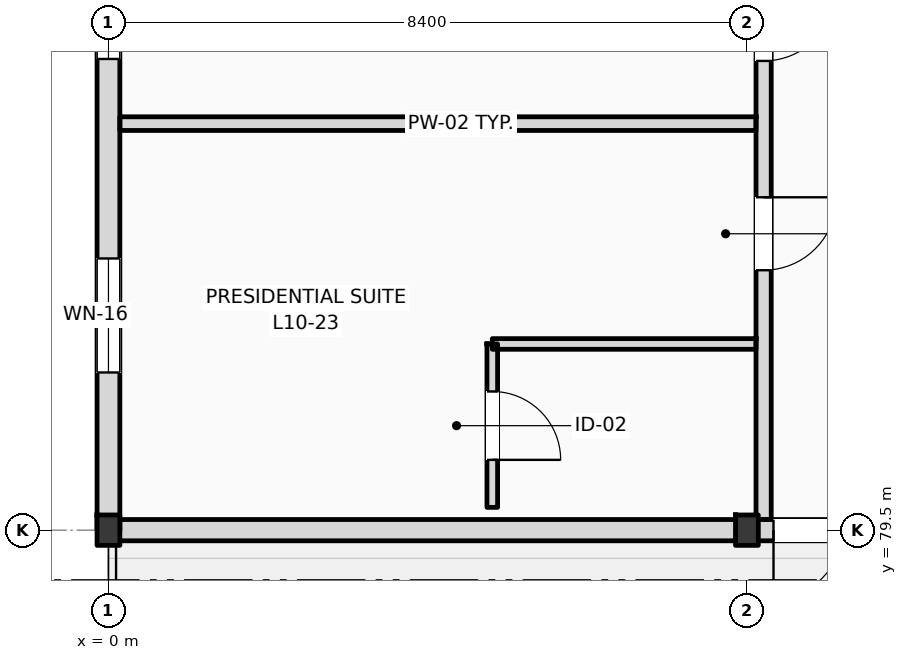
"""IFC4 building model, lengths in metres.
Left out: names, types, materials, properties, quantities, classifications, styles, units other than length and angle.
Written with IfcOpenShell. Run it as: python <this file> out.ifc"""

import sys

from ifc_helpers import new_model, si_unit, direction, frame, frame_2d, origin, origin_2d, place, context, subcontext, project, spatial, rectangle, i_section, extrude, element, fill, save


model = new_model("IFC4")
c1 = context("Model", 3, precision=1e-05, world=origin(), true_north=direction((0.0, 1.0)))
c2 = subcontext(c1, "Body", "Model", "MODEL_VIEW")
j1 = project(units=[si_unit("LENGTHUNIT", "METRE"), si_unit("PLANEANGLEUNIT", "RADIAN")], contexts=[c1])
p1 = place(None, origin())
s1 = spatial("IfcSite", under=j1, at=p1, CompositionType="ELEMENT")
p2 = place(p1, origin())
s2 = spatial("IfcBuilding", under=s1, at=p2, CompositionType="ELEMENT")
p3 = place(p2, frame((0.0, 0.0, 42.6)))
s3 = spatial("IfcBuildingStorey", under=s2, at=p3, CompositionType="ELEMENT", Elevation=42.6)
for number, where, z_axis, x_axis in (
    (1, (0.0, 79.5, 0.0), (0.0, 0.0, 1.0), (1.0, 0.0, 0.0)),
    (2, (8.4, 79.5, 0.0), (0.0, 0.0, 1.0), (1.0, 0.0, 0.0)),
):
    element("IfcColumn", number, at=place(p3, frame(where, z_axis=z_axis, x_axis=x_axis)), inside=s3, PredefinedType="COLUMN", context=c2, shape_type="SweptSolid", body=[
        extrude(i_section(OverallWidth=0.3, OverallDepth=0.4, WebThickness=0.013, FlangeThickness=0.024, FilletRadius=0.027, at=origin_2d()), origin(), (0.0, 0.0, 1.0), 4.2),
    ])
p4 = place(p3, frame((0.0, 79.5, 0.0), z_axis=(0.0, 0.0, 1.0), x_axis=(0.0, 1.0, 0.0)))
e3 = element("IfcWall", 3, at=p4, inside=s3, PredefinedType="STANDARD", context=c2, shape_type="SweptSolid", body=[
    extrude(rectangle(XDim=8.5, YDim=0.3, at=frame_2d((4.25, 0.0))), origin(), (0.0, 0.0, 1.0), 3.57),
])
p5 = place(p4, frame((2.075, 0.0, 0.9)))
e4 = element("IfcOpeningElement", 4, at=p5, cuts=e3, PredefinedType="OPENING", context=c2, shape_type="SweptSolid", body=[
    extrude(rectangle(XDim=1.5, YDim=2.49, at=frame_2d((0.75, 1.245))), frame((0.0, 0.16, 0.0), z_axis=(0.0, -1.0, 0.0), x_axis=(1.0, 0.0, 0.0)), (0.0, 0.0, 1.0), 0.32),
])
p6 = place(p4, frame((6.2, 0.0, 0.9)))
e5 = element("IfcOpeningElement", 5, at=p6, cuts=e3, PredefinedType="OPENING", context=c2, shape_type="SweptSolid", body=[
    extrude(rectangle(XDim=1.5, YDim=2.49, at=frame_2d((0.75, 1.245))), frame((0.0, 0.16, 0.0), z_axis=(0.0, -1.0, 0.0), x_axis=(1.0, 0.0, 0.0)), (0.0, 0.0, 1.0), 0.32),
])
p7 = place(p3, frame((0.0, 79.5, 0.0), z_axis=(0.0, 0.0, 1.0), x_axis=(1.0, 0.0, 0.0)))
e6 = element("IfcWall", 6, at=p7, inside=s3, PredefinedType="STANDARD", context=c2, shape_type="SweptSolid", body=[
    extrude(rectangle(XDim=25.2, YDim=0.28, at=frame_2d((12.6, 0.0))), origin(), (0.0, 0.0, 1.0), 3.38),
])
p8 = place(p7, frame((8.75, 0.0, 0.0)))
e7 = element("IfcOpeningElement", 7, at=p8, cuts=e6, PredefinedType="OPENING", context=c2, shape_type="SweptSolid", body=[
    extrude(rectangle(XDim=1.8, YDim=2.4, at=frame_2d((0.9, 1.2))), frame((0.0, 0.15, 0.0), z_axis=(0.0, -1.0, 0.0), x_axis=(1.0, 0.0, 0.0)), (0.0, 0.0, 1.0), 0.3),
])
p9 = place(p3, frame((8.62, 79.64, 0.0), z_axis=(0.0, 0.0, 1.0), x_axis=(0.0, 1.0, 0.0)))
e8 = element("IfcWall", 8, at=p9, inside=s3, PredefinedType="PARTITIONING", context=c2, shape_type="SweptSolid", body=[
    extrude(rectangle(XDim=15.66, YDim=0.2, at=frame_2d((7.83, 0.0))), origin(), (0.0, 0.0, 1.0), 3.57),
])
p10 = place(p9, frame((3.28, 0.0, 0.0)))
e9 = element("IfcOpeningElement", 9, at=p10, cuts=e8, PredefinedType="OPENING", context=c2, shape_type="SweptSolid", body=[
    extrude(rectangle(XDim=0.96, YDim=2.2, at=frame_2d((0.48, 1.1))), frame((0.0, 0.11, 0.0), z_axis=(0.0, -1.0, 0.0), x_axis=(1.0, 0.0, 0.0)), (0.0, 0.0, 1.0), 0.22),
])
p11 = place(p9, frame((6.034, 0.0, 0.0)))
e10 = element("IfcOpeningElement", 10, at=p11, cuts=e8, PredefinedType="OPENING", context=c2, shape_type="SweptSolid", body=[
    extrude(rectangle(XDim=0.96, YDim=2.2, at=frame_2d((0.48, 1.1))), frame((0.0, 0.11, 0.0), z_axis=(0.0, -1.0, 0.0), x_axis=(1.0, 0.0, 0.0)), (0.0, 0.0, 1.0), 0.22),
])
p12 = place(p9, frame((13.61, 0.0, 0.0)))
e11 = element("IfcOpeningElement", 11, at=p12, cuts=e8, PredefinedType="OPENING", context=c2, shape_type="SweptSolid", body=[
    extrude(rectangle(XDim=0.96, YDim=2.2, at=frame_2d((0.48, 1.1))), frame((0.0, 0.11, 0.0), z_axis=(0.0, -1.0, 0.0), x_axis=(1.0, 0.0, 0.0)), (0.0, 0.0, 1.0), 0.22),
])
p13 = place(p3, frame((0.15, 84.849, 0.0), z_axis=(0.0, 0.0, 1.0), x_axis=(1.0, 0.0, 0.0)))
e12 = element("IfcWall", 12, at=p13, inside=s3, PredefinedType="PARTITIONING", context=c2, shape_type="SweptSolid", body=[
    extrude(rectangle(XDim=8.37, YDim=0.18, at=frame_2d((4.185, 0.0))), origin(), (0.0, 0.0, 1.0), 3.94),
])
p14 = place(p3, frame((5.05, 81.95, 0.0), z_axis=(0.0, 0.0, 1.0), x_axis=(1.0, 0.0, 0.0)))
e13 = element("IfcWall", 13, at=p14, inside=s3, PredefinedType="PARTITIONING", context=c2, shape_type="SweptSolid", body=[
    extrude(rectangle(XDim=3.47, YDim=0.14, at=frame_2d((1.735, 0.0))), origin(), (0.0, 0.0, 1.0), 3.94),
])
p15 = place(p3, frame((5.05, 79.8, 0.0), z_axis=(0.0, 0.0, 1.0), x_axis=(0.0, 1.0, 0.0)))
e14 = element("IfcWall", 14, at=p15, inside=s3, PredefinedType="PARTITIONING", context=c2, shape_type="SweptSolid", body=[
    extrude(rectangle(XDim=2.15, YDim=0.14, at=frame_2d((1.075, 0.0))), origin(), (0.0, 0.0, 1.0), 3.94),
])
p16 = place(p15, frame((0.625, 0.0, 0.0)))
e15 = element("IfcOpeningElement", 15, at=p16, cuts=e14, PredefinedType="OPENING", context=c2, shape_type="SweptSolid", body=[
    extrude(rectangle(XDim=0.9, YDim=2.1, at=frame_2d((0.45, 1.05))), frame((0.0, 0.08, 0.0), z_axis=(0.0, -1.0, 0.0), x_axis=(1.0, 0.0, 0.0)), (0.0, 0.0, 1.0), 0.16),
])
p17 = place(p8, frame((1.8, 0.0, 0.0), z_axis=(0.0, 0.0, 1.0), x_axis=(-1.0, 0.0, 0.0)))
e16 = element("IfcDoor", 16, at=p17, inside=s3, OperationType="DOUBLE_SWING_LEFT", PredefinedType="DOOR", context=c2, shape_type="SweptSolid", body=[
    extrude(rectangle(XDim=1.8, YDim=2.4, at=frame_2d((0.9, 1.2))), frame((0.0, 0.025, 0.0), z_axis=(0.0, -1.0, 0.0), x_axis=(1.0, 0.0, 0.0)), (0.0, 0.0, 1.0), 0.05),
])
fill(e7, e16)
p18 = place(p5, origin())
e17 = element("IfcWindow", 17, at=p18, inside=s3, PartitioningType="DOUBLE_PANEL_VERTICAL", PredefinedType="WINDOW", context=c2, shape_type="SweptSolid", body=[
    extrude(rectangle(XDim=1.5, YDim=2.49, at=frame_2d((0.75, 1.245))), frame((0.0, 0.03, 0.0), z_axis=(0.0, -1.0, 0.0), x_axis=(1.0, 0.0, 0.0)), (0.0, 0.0, 1.0), 0.06),
])
fill(e4, e17)
p19 = place(p6, origin())
e18 = element("IfcWindow", 18, at=p19, inside=s3, PartitioningType="DOUBLE_PANEL_VERTICAL", PredefinedType="WINDOW", context=c2, shape_type="SweptSolid", body=[
    extrude(rectangle(XDim=1.5, YDim=2.49, at=frame_2d((0.75, 1.245))), frame((0.0, 0.03, 0.0), z_axis=(0.0, -1.0, 0.0), x_axis=(1.0, 0.0, 0.0)), (0.0, 0.0, 1.0), 0.06),
])
fill(e5, e18)
p20 = place(p10, frame((0.96, 0.0, 0.0), z_axis=(0.0, 0.0, 1.0), x_axis=(-1.0, 0.0, 0.0)))
e19 = element("IfcDoor", 19, at=p20, inside=s3, OperationType="SINGLE_SWING_RIGHT", PredefinedType="DOOR", context=c2, shape_type="SweptSolid", body=[
    extrude(rectangle(XDim=0.96, YDim=2.2, at=frame_2d((0.48, 1.1))), frame((0.0, 0.025, 0.0), z_axis=(0.0, -1.0, 0.0), x_axis=(1.0, 0.0, 0.0)), (0.0, 0.0, 1.0), 0.05),
])
fill(e9, e19)
p21 = place(p16, frame((0.9, 0.0, 0.0), z_axis=(0.0, 0.0, 1.0), x_axis=(-1.0, 0.0, 0.0)))
e20 = element("IfcDoor", 20, at=p21, inside=s3, OperationType="SINGLE_SWING_LEFT", PredefinedType="DOOR", context=c2, shape_type="SweptSolid", body=[
    extrude(rectangle(XDim=0.9, YDim=2.1, at=frame_2d((0.45, 1.05))), frame((0.0, 0.025, 0.0), z_axis=(0.0, -1.0, 0.0), x_axis=(1.0, 0.0, 0.0)), (0.0, 0.0, 1.0), 0.05),
])
fill(e15, e20)
p22 = place(p11, frame((0.96, 0.0, 0.0), z_axis=(0.0, 0.0, 1.0), x_axis=(-1.0, 0.0, 0.0)))
e21 = element("IfcDoor", 21, at=p22, inside=s3, OperationType="SINGLE_SWING_RIGHT", PredefinedType="DOOR", context=c2, shape_type="SweptSolid", body=[
    extrude(rectangle(XDim=0.96, YDim=2.2, at=frame_2d((0.48, 1.1))), frame((0.0, 0.025, 0.0), z_axis=(0.0, -1.0, 0.0), x_axis=(1.0, 0.0, 0.0)), (0.0, 0.0, 1.0), 0.05),
])
fill(e10, e21)
save(model, sys.argv[1])
